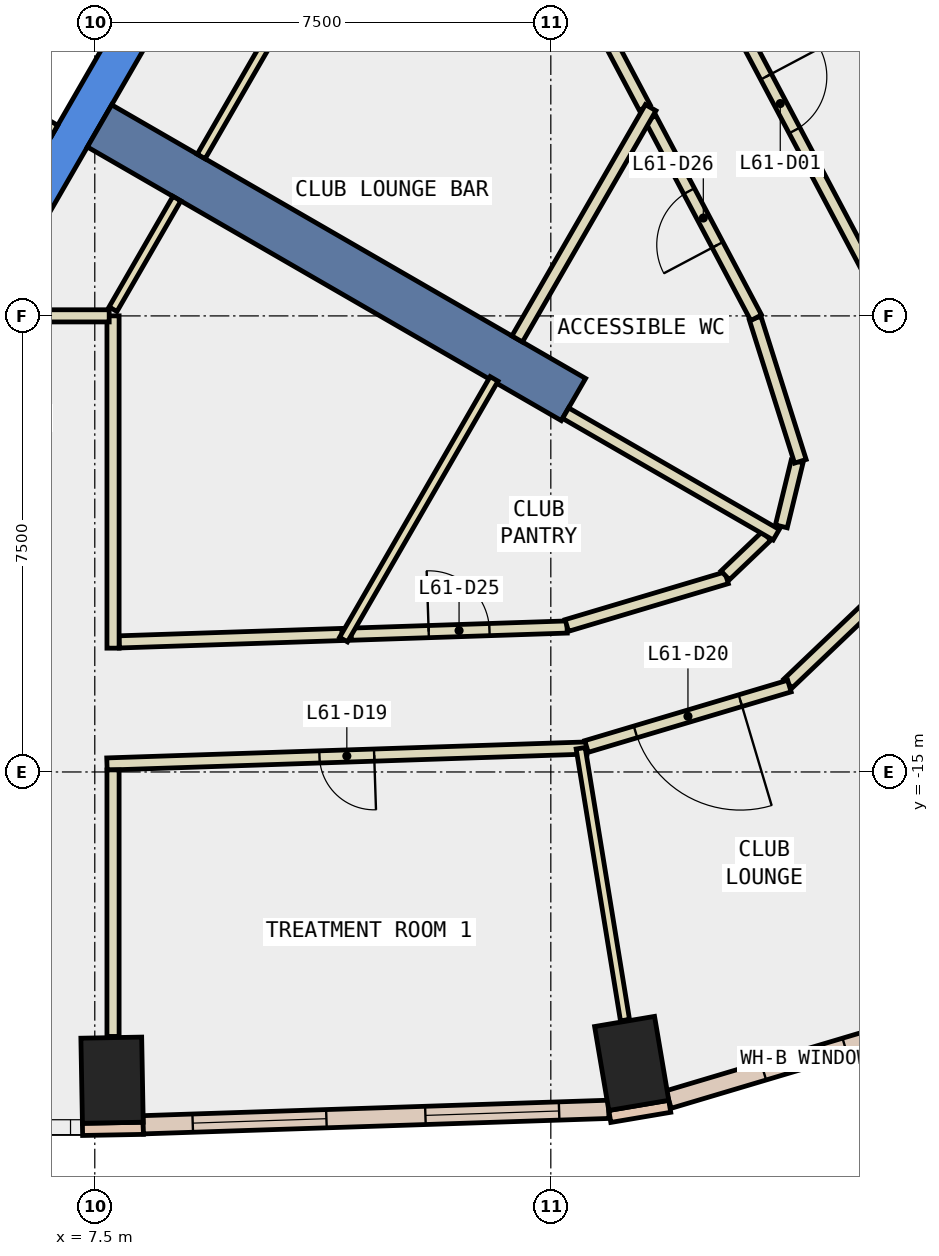
"""IFC4 building model, lengths in metres.
Left out: names, types, materials, properties, quantities, classifications, styles, units other than length and angle.
Written with IfcOpenShell. Run it as: python <this file> out.ifc"""

import sys

from ifc_helpers import new_model, si_unit, direction, frame, frame_2d, origin, origin_2d, place, context, subcontext, project, spatial, polyline, rectangle, outline, extrude, element, fill, save


model = new_model("IFC4")
c1 = context("Model", 3, precision=1e-05, world=origin(), true_north=direction((0.0, 1.0)))
c2 = subcontext(c1, "Body", "Model", "MODEL_VIEW")
j1 = project(units=[si_unit("LENGTHUNIT", "METRE"), si_unit("PLANEANGLEUNIT", "RADIAN")], contexts=[c1])
p1 = place(None, origin())
s1 = spatial("IfcSite", under=j1, at=p1, CompositionType="ELEMENT")
p2 = place(p1, origin())
s2 = spatial("IfcBuilding", under=s1, at=p2, CompositionType="ELEMENT")
p3 = place(p2, frame((0.0, 0.0, 266.6)))
s3 = spatial("IfcBuildingStorey", under=s2, at=p3, CompositionType="ELEMENT", Elevation=266.6)
for number, where, z_axis, x_axis in (
    (1, (7.784, -20.069, -0.34), (0.0, 0.0, 1.0), (1.0, 0.018, 0.0)),
    (2, (16.33, -19.793, -0.34), (0.0, 0.0, 1.0), (0.986, 0.167, 0.0)),
):
    element("IfcColumn", number, at=place(p3, frame(where, z_axis=z_axis, x_axis=x_axis)), inside=s3, PredefinedType="COLUMN", context=c2, shape_type="SweptSolid", body=[
        extrude(rectangle(XDim=1.0, YDim=1.4, at=origin_2d()), origin(), (0.0, 0.0, 1.0), 3.6),
    ])
p4 = place(p3, frame((0.0, 0.0, -0.34)))
e3 = element("IfcWall", 3, at=p4, inside=s3, PredefinedType="SHEAR", context=c2, shape_type="SweptSolid", body=[
    extrude(outline(polyline([(5.774, -7.5), (11.547, 2.5), (10.854, 2.5), (5.427, -6.9), (5.774, -7.5)])), origin(), (0.0, 0.0, 1.0), 3.6),
])
p5 = place(p3, frame((7.578, -4.375, -0.34), z_axis=(0.0, 0.0, 1.0), x_axis=(0.866024315419, -0.5000018851, 0.0)))
e4 = element("IfcWall", 4, at=p5, inside=s3, PredefinedType="SHEAR", context=c2, shape_type="SweptSolid", body=[
    extrude(rectangle(XDim=9.0, YDim=0.8, at=frame_2d((4.5, 0.0))), origin(), (0.0, 0.0, 1.0), 3.6),
])
for number, where, z_axis, x_axis in (
    (5, (7.298, -20.878, 0.0), (0.0, 0.0, 1.0), (1.0, 0.018, 0.0)),
    (6, (15.97, -20.665, 0.0), (0.0, 0.0, 1.0), (0.986, 0.167, 0.0)),
):
    element("IfcWall", number, at=place(p3, frame(where, z_axis=z_axis, x_axis=x_axis)), inside=s3, PredefinedType="STANDARD", context=c2, shape_type="SweptSolid", body=[
        extrude(rectangle(XDim=1.0, YDim=0.2, at=frame_2d((0.5, 0.0))), origin(), (0.0, 0.0, 1.0), 3.26),
    ])
p6 = place(p3, frame((8.296, -20.802, 0.0), z_axis=(0.0, 0.0, 1.0), x_axis=(0.999450376985, 0.033150323459, 0.0)))
e7 = element("IfcWall", 7, at=p6, inside=s3, PredefinedType="STANDARD", context=c2, shape_type="SweptSolid", body=[
    extrude(rectangle(XDim=7.659, YDim=0.3, at=frame_2d((3.83, 0.0))), origin(), (0.0, 0.0, 1.0), 3.26),
])
p7 = place(p6, frame((0.815, 0.0, 0.9)))
e8 = element("IfcOpeningElement", 8, at=p7, cuts=e7, PredefinedType="OPENING", context=c2, shape_type="SweptSolid", body=[
    extrude(rectangle(XDim=2.2, YDim=2.0, at=frame_2d((1.1, 1.0))), frame((0.0, 0.16, 0.0), z_axis=(0.0, -1.0, 0.0), x_axis=(1.0, 0.0, 0.0)), (0.0, 0.0, 1.0), 0.32),
])
p8 = place(p6, frame((4.644, 0.0, 0.9)))
e9 = element("IfcOpeningElement", 9, at=p8, cuts=e7, PredefinedType="OPENING", context=c2, shape_type="SweptSolid", body=[
    extrude(rectangle(XDim=2.2, YDim=2.0, at=frame_2d((1.1, 1.0))), frame((0.0, 0.16, 0.0), z_axis=(0.0, -1.0, 0.0), x_axis=(1.0, 0.0, 0.0)), (0.0, 0.0, 1.0), 0.32),
])
p9 = place(p3, frame((16.937, -20.387, 0.0), z_axis=(0.0, 0.0, 1.0), x_axis=(0.958361270465, 0.285558532131, 0.0)))
e10 = element("IfcWall", 10, at=p9, inside=s3, PredefinedType="STANDARD", context=c2, shape_type="SweptSolid", body=[
    extrude(rectangle(XDim=4.658, YDim=0.3, at=frame_2d((2.329, 0.0))), origin(), (0.0, 0.0, 1.0), 3.26),
])
p10 = place(p9, frame((1.629, 0.0, 0.9)))
e11 = element("IfcOpeningElement", 11, at=p10, cuts=e10, PredefinedType="OPENING", context=c2, shape_type="SweptSolid", body=[
    extrude(rectangle(XDim=1.4, YDim=2.0, at=frame_2d((0.7, 1.0))), frame((0.0, 0.16, 0.0), z_axis=(0.0, -1.0, 0.0), x_axis=(1.0, 0.0, 0.0)), (0.0, 0.0, 1.0), 0.32),
])
p11 = place(p3, frame((7.9, -12.861, 0.0), z_axis=(0.0, 0.0, 1.0), x_axis=(0.999446088303, 0.033279371614, 0.0)))
e12 = element("IfcWall", 12, at=p11, inside=s3, PredefinedType="PARTITIONING", context=c2, shape_type="SweptSolid", body=[
    extrude(rectangle(XDim=3.668, YDim=0.2, at=frame_2d((1.834, 0.0))), origin(), (0.0, 0.0, 1.0), 3.26),
])
p12 = place(p3, frame((16.545, -4.074, 0.0), z_axis=(0.0, 0.0, 1.0), x_axis=(-0.468321873419, 0.883557934081, 0.0)))
e13 = element("IfcWall", 13, at=p12, inside=s3, PredefinedType="PARTITIONING", context=c2, shape_type="SweptSolid", body=[
    extrude(rectangle(XDim=2.093, YDim=0.2, at=frame_2d((1.046, 0.0))), origin(), (0.0, 0.0, 1.0), 3.26),
])
p13 = place(p3, frame((11.716, -12.734, 0.0), z_axis=(0.0, 0.0, 1.0), x_axis=(0.999449093602, 0.03318899362, 0.0)))
e14 = element("IfcWall", 14, at=p13, inside=s3, PredefinedType="PARTITIONING", context=c2, shape_type="SweptSolid", body=[
    extrude(rectangle(XDim=3.553, YDim=0.2, at=frame_2d((1.776, 0.0))), origin(), (0.0, 0.0, 1.0), 3.26),
])
p14 = place(p13, frame((1.276, 0.0, 0.0)))
e15 = element("IfcOpeningElement", 15, at=p14, cuts=e14, PredefinedType="OPENING", context=c2, shape_type="SweptSolid", body=[
    extrude(rectangle(XDim=1.0, YDim=2.1, at=frame_2d((0.5, 1.05))), frame((0.0, 0.11, 0.0), z_axis=(0.0, -1.0, 0.0), x_axis=(1.0, 0.0, 0.0)), (0.0, 0.0, 1.0), 0.22),
])
p15 = place(p3, frame((15.263, -12.591, 0.0), z_axis=(0.0, 0.0, 1.0), x_axis=(0.958253964342, 0.285918414628, 0.0)))
e16 = element("IfcWall", 16, at=p15, inside=s3, PredefinedType="PARTITIONING", context=c2, shape_type="SweptSolid", body=[
    extrude(rectangle(XDim=2.743, YDim=0.2, at=frame_2d((1.371, 0.0))), origin(), (0.0, 0.0, 1.0), 3.26),
])
p16 = place(p3, frame((17.868, -11.767, 0.0), z_axis=(0.0, 0.0, 1.0), x_axis=(0.723402701671, 0.690426340181, 0.0)))
e17 = element("IfcWall", 17, at=p16, inside=s3, PredefinedType="PARTITIONING", context=c2, shape_type="SweptSolid", body=[
    extrude(rectangle(XDim=0.94, YDim=0.2, at=frame_2d((0.47, 0.0))), origin(), (0.0, 0.0, 1.0), 3.26),
])
p17 = place(p3, frame((18.791, -10.961, 0.0), z_axis=(0.0, 0.0, 1.0), x_axis=(0.236572634589, 0.971613806285, 0.0)))
e18 = element("IfcWall", 18, at=p17, inside=s3, PredefinedType="PARTITIONING", context=c2, shape_type="SweptSolid", body=[
    extrude(rectangle(XDim=1.099, YDim=0.2, at=frame_2d((0.55, 0.0))), origin(), (0.0, 0.0, 1.0), 3.26),
])
p18 = place(p3, frame((19.104, -9.891, 0.0), z_axis=(0.0, 0.0, 1.0), x_axis=(-0.301325410186, 0.953521366922, 0.0)))
e19 = element("IfcWall", 19, at=p18, inside=s3, PredefinedType="PARTITIONING", context=c2, shape_type="SweptSolid", body=[
    extrude(rectangle(XDim=2.469, YDim=0.2, at=frame_2d((1.234, 0.0))), origin(), (0.0, 0.0, 1.0), 3.26),
])
p19 = place(p3, frame((18.377, -7.53, 0.0), z_axis=(0.0, 0.0, 1.0), x_axis=(-0.468214048123, 0.883615077474, 0.0)))
e20 = element("IfcWall", 20, at=p19, inside=s3, PredefinedType="PARTITIONING", context=c2, shape_type="SweptSolid", body=[
    extrude(rectangle(XDim=3.712, YDim=0.2, at=frame_2d((1.856, 0.0))), origin(), (0.0, 0.0, 1.0), 3.26),
])
p20 = place(p19, frame((1.356, 0.0, 0.0)))
e21 = element("IfcOpeningElement", 21, at=p20, cuts=e20, PredefinedType="OPENING", context=c2, shape_type="SweptSolid", body=[
    extrude(rectangle(XDim=1.0, YDim=2.1, at=frame_2d((0.5, 1.05))), frame((0.0, 0.11, 0.0), z_axis=(0.0, -1.0, 0.0), x_axis=(1.0, 0.0, 0.0)), (0.0, 0.0, 1.0), 0.22),
])
p21 = place(p3, frame((15.591, -14.606, 0.0), z_axis=(0.0, 0.0, 1.0), x_axis=(-0.999445318732, -0.03330247535, 0.0)))
e22 = element("IfcWall", 22, at=p21, inside=s3, PredefinedType="PARTITIONING", context=c2, shape_type="SweptSolid", body=[
    extrude(rectangle(XDim=7.896, YDim=0.2, at=frame_2d((3.948, 0.0))), origin(), (0.0, 0.0, 1.0), 3.26),
])
p22 = place(p21, frame((3.498, 0.0, 0.0)))
e23 = element("IfcOpeningElement", 23, at=p22, cuts=e22, PredefinedType="OPENING", context=c2, shape_type="SweptSolid", body=[
    extrude(rectangle(XDim=0.9, YDim=2.1, at=frame_2d((0.45, 1.05))), frame((0.0, 0.11, 0.0), z_axis=(0.0, -1.0, 0.0), x_axis=(1.0, 0.0, 0.0)), (0.0, 0.0, 1.0), 0.22),
])
p23 = place(p3, frame((20.692, -11.837, 0.0), z_axis=(0.0, 0.0, 1.0), x_axis=(-0.723668833869, -0.690147389248, 0.0)))
e24 = element("IfcWall", 24, at=p23, inside=s3, PredefinedType="PARTITIONING", context=c2, shape_type="SweptSolid", body=[
    extrude(rectangle(XDim=2.476, YDim=0.2, at=frame_2d((1.238, 0.0))), origin(), (0.0, 0.0, 1.0), 3.26),
])
p24 = place(p3, frame((18.924, -13.587, 0.0), z_axis=(0.0, 0.0, 1.0), x_axis=(-0.958378336681, -0.285501250052, 0.0)))
e25 = element("IfcWall", 25, at=p24, inside=s3, PredefinedType="PARTITIONING", context=c2, shape_type="SweptSolid", body=[
    extrude(rectangle(XDim=3.482, YDim=0.2, at=frame_2d((1.741, 0.0))), origin(), (0.0, 0.0, 1.0), 3.26),
])
p25 = place(p24, frame((0.841, 0.0, 0.0)))
e26 = element("IfcOpeningElement", 26, at=p25, cuts=e25, PredefinedType="OPENING", context=c2, shape_type="SweptSolid", body=[
    extrude(rectangle(XDim=1.8, YDim=2.1, at=frame_2d((0.9, 1.05))), frame((0.0, 0.11, 0.0), z_axis=(0.0, -1.0, 0.0), x_axis=(1.0, 0.0, 0.0)), (0.0, 0.0, 1.0), 0.22),
])
p26 = place(p3, frame((17.318, -1.262, 0.0), z_axis=(0.0, 0.0, 1.0), x_axis=(0.468313568794, -0.883562335822, 0.0)))
e27 = element("IfcWall", 27, at=p26, inside=s3, PredefinedType="PARTITIONING", context=c2, shape_type="SweptSolid", body=[
    extrude(rectangle(XDim=6.216, YDim=0.2, at=frame_2d((3.108, 0.0))), origin(), (0.0, 0.0, 1.0), 3.26),
])
p27 = place(p26, frame((2.608, 0.0, 0.0)))
e28 = element("IfcOpeningElement", 28, at=p27, cuts=e27, PredefinedType="OPENING", context=c2, shape_type="SweptSolid", body=[
    extrude(rectangle(XDim=1.0, YDim=2.1, at=frame_2d((0.5, 1.05))), frame((0.0, 0.11, 0.0), z_axis=(0.0, -1.0, 0.0), x_axis=(1.0, 0.0, 0.0)), (0.0, 0.0, 1.0), 0.22),
])
p28 = place(p3, frame((5.751, -3.938, 0.0), z_axis=(0.0, 0.0, 1.0), x_axis=(0.500034260056, 0.866005622828, 0.0)))
e29 = element("IfcWall", 29, at=p28, inside=s3, PredefinedType="PARTITIONING", context=c2, shape_type="SweptSolid", body=[
    extrude(rectangle(XDim=5.399, YDim=0.2, at=frame_2d((2.7, 0.0))), origin(), (0.0, 0.0, 1.0), 3.26),
])
p29 = place(p3, frame((6.841, -4.452, 0.0), z_axis=(0.0, 0.0, 1.0), x_axis=(-0.86621513555, 0.499671230855, 0.0)))
e30 = element("IfcWall", 30, at=p29, inside=s3, PredefinedType="PARTITIONING", context=c2, shape_type="SweptSolid", body=[
    extrude(rectangle(XDim=1.1, YDim=0.2, at=frame_2d((0.55, 0.0))), origin(), (0.0, 0.0, 1.0), 3.26),
])
p30 = place(p3, frame((7.8, -7.39, 0.0), z_axis=(0.0, 0.0, 1.0), x_axis=(0.499977374825, 0.866038466041, 0.0)))
e31 = element("IfcWall", 31, at=p30, inside=s3, PredefinedType="PARTITIONING", context=c2, shape_type="SweptSolid", body=[
    extrude(rectangle(XDim=2.1, YDim=0.15, at=frame_2d((1.05, 0.0))), origin(), (0.0, 0.0, 1.0), 3.26),
])
p31 = place(p3, frame((7.8, -7.499, 0.0), z_axis=(0.0, 0.0, 1.0), x_axis=(0.0, -1.0, 0.0)))
e32 = element("IfcWall", 32, at=p31, inside=s3, PredefinedType="PARTITIONING", context=c2, shape_type="SweptSolid", body=[
    extrude(rectangle(XDim=5.465, YDim=0.2, at=frame_2d((2.732, 0.0))), origin(), (0.0, 0.0, 1.0), 3.26),
])
p32 = place(p3, frame((7.8, -14.966, 0.0), z_axis=(0.0, 0.0, 1.0), x_axis=(0.0, -1.0, 0.0)))
e33 = element("IfcWall", 33, at=p32, inside=s3, PredefinedType="PARTITIONING", context=c2, shape_type="SweptSolid", body=[
    extrude(rectangle(XDim=4.383, YDim=0.2, at=frame_2d((2.191, 0.0))), origin(), (0.0, 0.0, 1.0), 3.26),
])
p33 = place(p3, frame((14.067, -8.536, 0.0), z_axis=(0.0, 0.0, 1.0), x_axis=(-0.500100941679, -0.865967117235, 0.0)))
e34 = element("IfcWall", 34, at=p33, inside=s3, PredefinedType="PARTITIONING", context=c2, shape_type="SweptSolid", body=[
    extrude(rectangle(XDim=4.951, YDim=0.15, at=frame_2d((2.475, 0.0))), origin(), (0.0, 0.0, 1.0), 3.26),
])
p34 = place(p3, frame((16.642, -4.075, 0.0), z_axis=(0.0, 0.0, 1.0), x_axis=(-0.49980426207, -0.866138383641, 0.0)))
e35 = element("IfcWall", 35, at=p34, inside=s3, PredefinedType="PARTITIONING", context=c2, shape_type="SweptSolid", body=[
    extrude(rectangle(XDim=4.392, YDim=0.2, at=frame_2d((2.196, 0.0))), origin(), (0.0, 0.0, 1.0), 3.26),
])
p35 = place(p3, frame((15.243, -9.099, 0.0), z_axis=(0.0, 0.0, 1.0), x_axis=(0.866026010844, -0.49999894854, 0.0)))
e36 = element("IfcWall", 36, at=p35, inside=s3, PredefinedType="PARTITIONING", context=c2, shape_type="SweptSolid", body=[
    extrude(rectangle(XDim=4.0, YDim=0.2, at=frame_2d((2.0, 0.0))), origin(), (0.0, 0.0, 1.0), 3.26),
])
p36 = place(p3, frame((15.491, -14.61, 0.0), z_axis=(0.0, 0.0, 1.0), x_axis=(0.160928343418, -0.986966092774, 0.0)))
e37 = element("IfcWall", 37, at=p36, inside=s3, PredefinedType="PARTITIONING", context=c2, shape_type="SweptSolid", body=[
    extrude(rectangle(XDim=4.53, YDim=0.15, at=frame_2d((2.265, 0.0))), origin(), (0.0, 0.0, 1.0), 3.26),
])
p37 = place(p3, frame((9.25, -4.878, 0.0), z_axis=(0.0, 0.0, 1.0), x_axis=(0.499982416899, 0.866035555154, 0.0)))
e38 = element("IfcWall", 38, at=p37, inside=s3, PredefinedType="PARTITIONING", context=c2, shape_type="SweptSolid", body=[
    extrude(rectangle(XDim=8.048, YDim=0.15, at=frame_2d((4.024, 0.0))), origin(), (0.0, 0.0, 1.0), 3.26),
])
p38 = place(p3, frame((5.944, -7.499, 0.0), z_axis=(0.0, 0.0, 1.0), x_axis=(1.0, 0.0, 0.0)))
e39 = element("IfcWall", 39, at=p38, inside=s3, PredefinedType="PARTITIONING", context=c2, shape_type="SweptSolid", body=[
    extrude(rectangle(XDim=1.793, YDim=0.2, at=frame_2d((0.896, 0.0))), origin(), (0.0, 0.0, 1.0), 3.26),
])
p39 = place(p3, frame((5.492, -3.788, 0.0), z_axis=(0.0, 0.0, 1.0), x_axis=(0.500034260056, 0.866005622828, 0.0)))
e40 = element("IfcWall", 40, at=p39, inside=s3, PredefinedType="STANDARD", context=c2, shape_type="SweptSolid", body=[
    extrude(rectangle(XDim=5.399, YDim=0.2, at=frame_2d((2.7, 0.0))), origin(), (0.0, 0.0, 1.0), 3.26),
])
p40 = place(p7, origin())
e41 = element("IfcWindow", 41, at=p40, inside=s3, PartitioningType="SINGLE_PANEL", PredefinedType="WINDOW", context=c2, shape_type="SweptSolid", body=[
    extrude(rectangle(XDim=2.2, YDim=2.0, at=frame_2d((1.1, 1.0))), frame((0.0, 0.03, 0.0), z_axis=(0.0, -1.0, 0.0), x_axis=(1.0, 0.0, 0.0)), (0.0, 0.0, 1.0), 0.06),
])
fill(e8, e41)
p41 = place(p8, origin())
e42 = element("IfcWindow", 42, at=p41, inside=s3, PartitioningType="SINGLE_PANEL", PredefinedType="WINDOW", context=c2, shape_type="SweptSolid", body=[
    extrude(rectangle(XDim=2.2, YDim=2.0, at=frame_2d((1.1, 1.0))), frame((0.0, 0.03, 0.0), z_axis=(0.0, -1.0, 0.0), x_axis=(1.0, 0.0, 0.0)), (0.0, 0.0, 1.0), 0.06),
])
fill(e9, e42)
p42 = place(p10, origin())
e43 = element("IfcWindow", 43, at=p42, inside=s3, PartitioningType="SINGLE_PANEL", PredefinedType="WINDOW", context=c2, shape_type="SweptSolid", body=[
    extrude(rectangle(XDim=1.4, YDim=2.0, at=frame_2d((0.7, 1.0))), frame((0.0, 0.03, 0.0), z_axis=(0.0, -1.0, 0.0), x_axis=(1.0, 0.0, 0.0)), (0.0, 0.0, 1.0), 0.06),
])
fill(e11, e43)
p43 = place(p27, origin())
e44 = element("IfcDoor", 44, at=p43, inside=s3, OperationType="SINGLE_SWING_LEFT", PredefinedType="DOOR", context=c2, shape_type="SweptSolid", body=[
    extrude(rectangle(XDim=1.0, YDim=2.1, at=frame_2d((0.5, 1.05))), frame((0.0, 0.025, 0.0), z_axis=(0.0, -1.0, 0.0), x_axis=(1.0, 0.0, 0.0)), (0.0, 0.0, 1.0), 0.05),
])
fill(e28, e44)
p44 = place(p22, origin())
e45 = element("IfcDoor", 45, at=p44, inside=s3, OperationType="SINGLE_SWING_LEFT", PredefinedType="DOOR", context=c2, shape_type="SweptSolid", body=[
    extrude(rectangle(XDim=0.9, YDim=2.1, at=frame_2d((0.45, 1.05))), frame((0.0, 0.025, 0.0), z_axis=(0.0, -1.0, 0.0), x_axis=(1.0, 0.0, 0.0)), (0.0, 0.0, 1.0), 0.05),
])
fill(e23, e45)
p45 = place(p25, origin())
e46 = element("IfcDoor", 46, at=p45, inside=s3, OperationType="DOUBLE_DOOR_SINGLE_SWING", PredefinedType="DOOR", context=c2, shape_type="SweptSolid", body=[
    extrude(rectangle(XDim=1.8, YDim=2.1, at=frame_2d((0.9, 1.05))), frame((0.0, 0.025, 0.0), z_axis=(0.0, -1.0, 0.0), x_axis=(1.0, 0.0, 0.0)), (0.0, 0.0, 1.0), 0.05),
])
fill(e26, e46)
p46 = place(p14, origin())
e47 = element("IfcDoor", 47, at=p46, inside=s3, OperationType="SINGLE_SWING_LEFT", PredefinedType="DOOR", context=c2, shape_type="SweptSolid", body=[
    extrude(rectangle(XDim=1.0, YDim=2.1, at=frame_2d((0.5, 1.05))), frame((0.0, 0.025, 0.0), z_axis=(0.0, -1.0, 0.0), x_axis=(1.0, 0.0, 0.0)), (0.0, 0.0, 1.0), 0.05),
])
fill(e15, e47)
p47 = place(p20, origin())
e48 = element("IfcDoor", 48, at=p47, inside=s3, OperationType="SINGLE_SWING_RIGHT", PredefinedType="DOOR", context=c2, shape_type="SweptSolid", body=[
    extrude(rectangle(XDim=1.0, YDim=2.1, at=frame_2d((0.5, 1.05))), frame((0.0, 0.025, 0.0), z_axis=(0.0, -1.0, 0.0), x_axis=(1.0, 0.0, 0.0)), (0.0, 0.0, 1.0), 0.05),
])
fill(e21, e48)
save(model, sys.argv[1])
